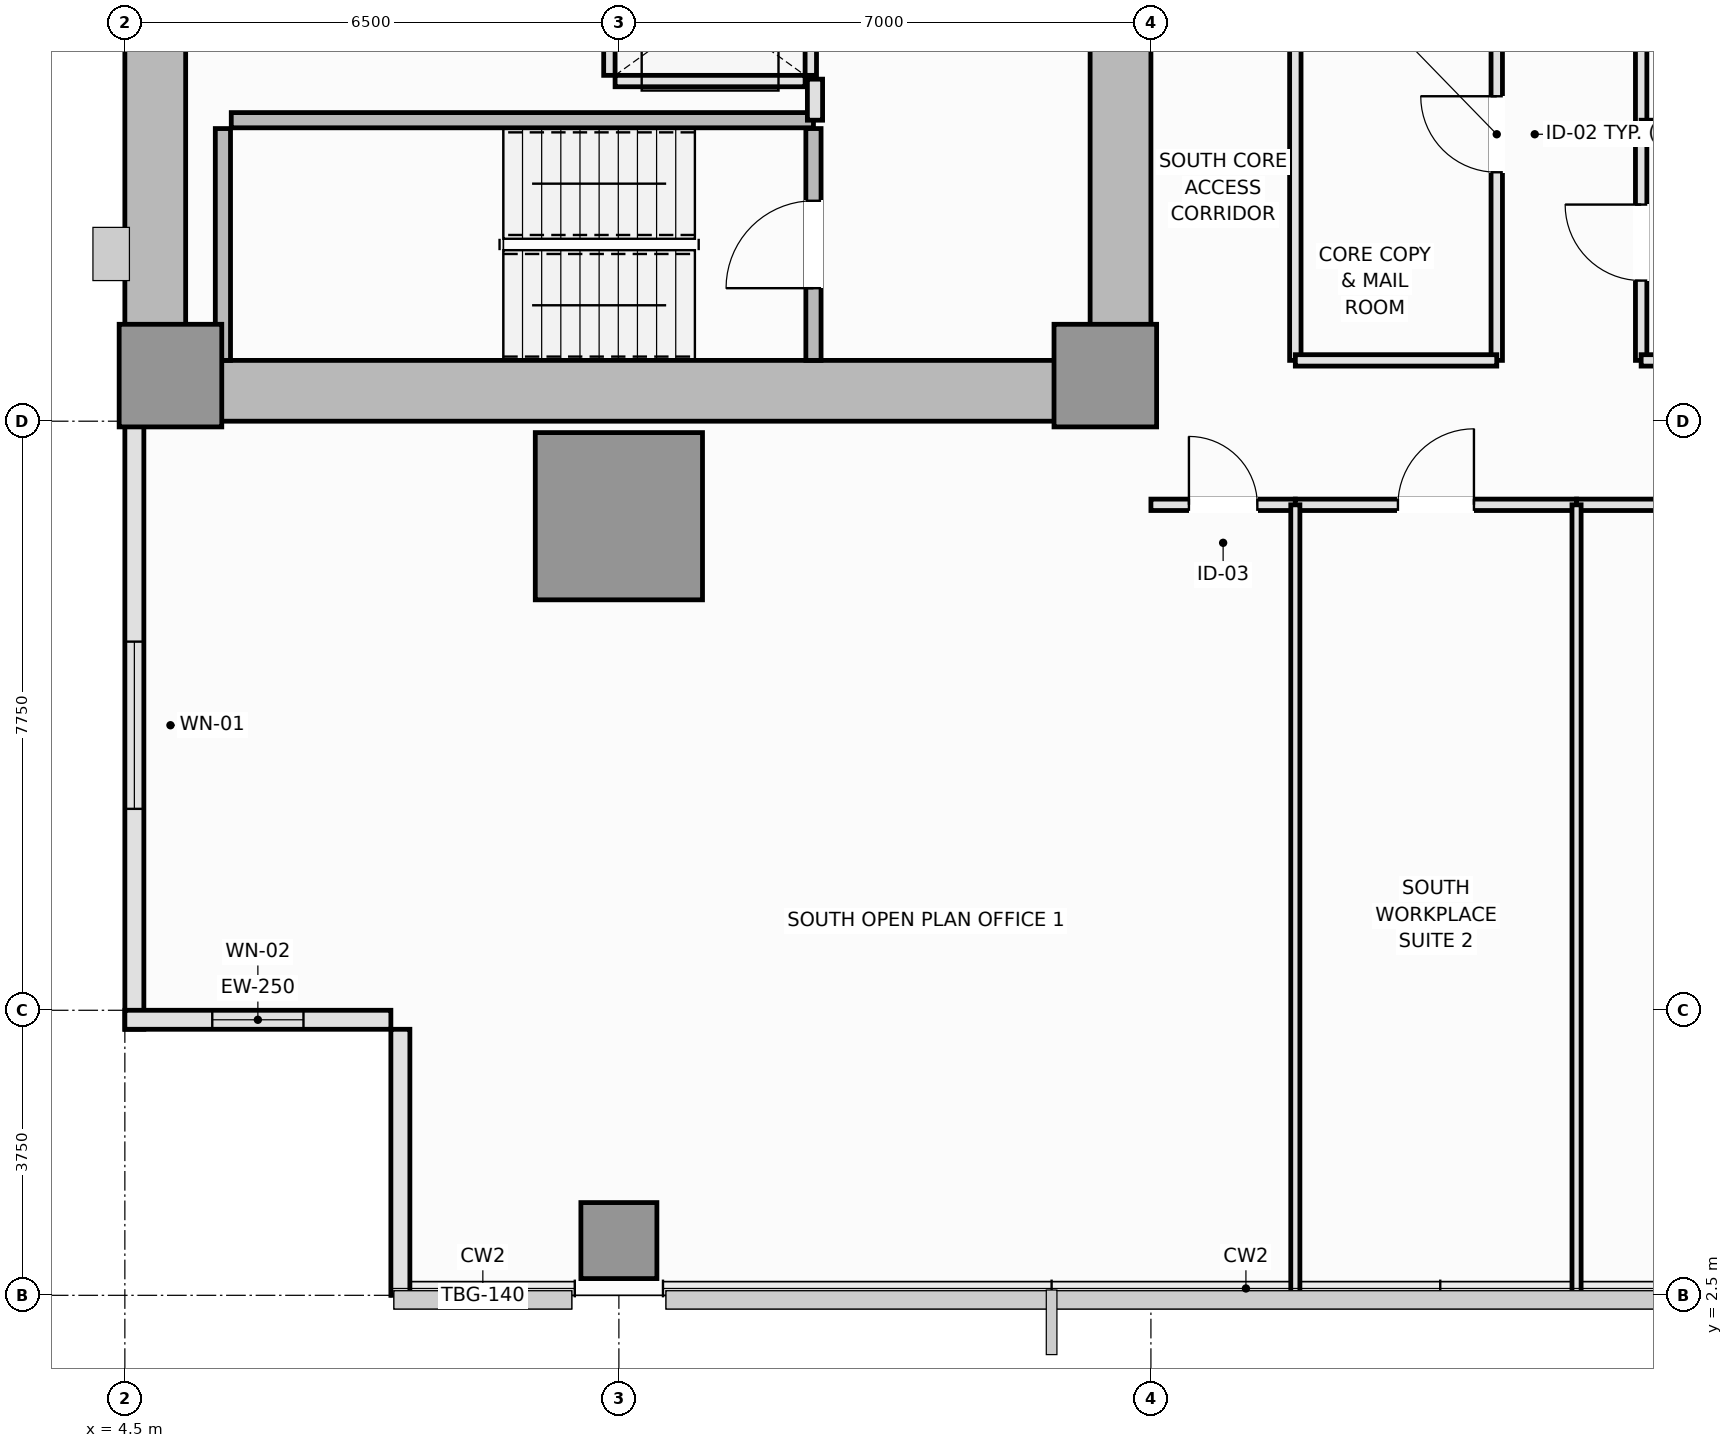
"""IFC4 building model, lengths in metres.
Left out: names, types, materials, properties, quantities, classifications, styles, units other than length and angle.
Written with IfcOpenShell. Run it as: python <this file> out.ifc"""

import sys

from ifc_helpers import new_model, si_unit, direction, frame, frame_2d, origin, origin_2d, place, context, subcontext, project, spatial, rectangle, extrude, element, fill, save


model = new_model("IFC4")
c1 = context("Model", 3, precision=1e-05, world=origin(), true_north=direction((0.0, 1.0)))
c2 = subcontext(c1, "Body", "Model", "MODEL_VIEW")
j1 = project(units=[si_unit("LENGTHUNIT", "METRE"), si_unit("PLANEANGLEUNIT", "RADIAN")], contexts=[c1])
p1 = place(None, origin())
s1 = spatial("IfcSite", under=j1, at=p1, CompositionType="ELEMENT")
p2 = place(p1, origin())
s2 = spatial("IfcBuilding", under=s1, at=p2, CompositionType="ELEMENT")
p3 = place(p2, frame((0.0, 0.0, 82.4)))
s3 = spatial("IfcBuildingStorey", under=s2, at=p3, CompositionType="ELEMENT", Elevation=82.4)
p4 = place(p3, frame((4.5, 14.4, 0.0), z_axis=(0.0, 0.0, 1.0), x_axis=(1.0, 0.0, 0.0)))
e1 = element("IfcWall", 1, at=p4, inside=s3, PredefinedType="SHEAR", context=c2, shape_type="SweptSolid", body=[
    extrude(rectangle(XDim=13.5, YDim=0.8, at=frame_2d((6.75, 0.0))), origin(), (0.0, 0.0, 1.0), 3.55),
])
p5 = place(p3, frame((4.9, 14.8, 0.0), z_axis=(0.0, 0.0, 1.0), x_axis=(0.0, 1.0, 0.0)))
e2 = element("IfcWall", 2, at=p5, inside=s3, PredefinedType="SHEAR", context=c2, shape_type="SweptSolid", body=[
    extrude(rectangle(XDim=20.9, YDim=0.8, at=frame_2d((10.45, 0.0))), origin(), (0.0, 0.0, 1.0), 3.55),
])
p6 = place(p3, frame((17.6, 14.8, 0.0), z_axis=(0.0, 0.0, 1.0), x_axis=(0.0, 1.0, 0.0)))
e3 = element("IfcWall", 3, at=p6, inside=s3, PredefinedType="SHEAR", context=c2, shape_type="SweptSolid", body=[
    extrude(rectangle(XDim=8.65, YDim=0.8, at=frame_2d((4.325, 0.0))), origin(), (0.0, 0.0, 1.0), 3.55),
])
p7 = place(p6, frame((4.1, 0.0, 0.0)))
e4 = element("IfcOpeningElement", 4, at=p7, cuts=e3, PredefinedType="OPENING", context=c2, shape_type="SweptSolid", body=[
    extrude(rectangle(XDim=1.1, YDim=2.15, at=frame_2d((0.55, 1.075))), frame((0.0, 0.41, 0.0), z_axis=(0.0, -1.0, 0.0), x_axis=(1.0, 0.0, 0.0)), (0.0, 0.0, 1.0), 0.82),
])
for number, where, z_axis, x_axis in (
    (5, (5.1, 14.6, 0.0), (0.0, 0.0, 1.0), (1.0, 0.0, 0.0)),
    (6, (17.4, 14.6, 0.0), (0.0, 0.0, 1.0), (1.0, 0.0, 0.0)),
):
    element("IfcColumn", number, at=place(p3, frame(where, z_axis=z_axis, x_axis=x_axis)), inside=s3, PredefinedType="PILASTER", context=c2, shape_type="SweptSolid", body=[
        extrude(rectangle(XDim=1.35, YDim=1.35, at=origin_2d()), origin(), (0.0, 0.0, 1.0), 3.55),
    ])
p8 = place(p3, frame((11.0, 12.75, 0.0), z_axis=(0.0, 0.0, 1.0), x_axis=(1.0, 0.0, 0.0)))
e7 = element("IfcColumn", 7, at=p8, inside=s3, PredefinedType="COLUMN", context=c2, shape_type="SweptSolid", body=[
    extrude(rectangle(XDim=2.2, YDim=2.2, at=origin_2d()), origin(), (0.0, 0.0, 1.0), 3.55),
])
p9 = place(p3, frame((11.0, 3.22, 0.0), z_axis=(0.0, 0.0, 1.0), x_axis=(1.0, 0.0, 0.0)))
e8 = element("IfcColumn", 8, at=p9, inside=s3, PredefinedType="COLUMN", context=c2, shape_type="SweptSolid", body=[
    extrude(rectangle(XDim=1.0, YDim=1.0, at=origin_2d()), origin(), (0.0, 0.0, 1.0), 3.55),
])
p10 = place(p3, frame((4.625, 14.0, 0.0), z_axis=(0.0, 0.0, 1.0), x_axis=(0.0, -1.0, 0.0)))
e9 = element("IfcWall", 9, at=p10, inside=s3, PredefinedType="SOLIDWALL", context=c2, shape_type="SweptSolid", body=[
    extrude(rectangle(XDim=8.0, YDim=0.25, at=frame_2d((4.0, 0.0))), origin(), (0.0, 0.0, 1.0), 3.37),
])
p11 = place(p10, frame((2.9, 0.0, 0.9)))
e10 = element("IfcOpeningElement", 10, at=p11, cuts=e9, PredefinedType="OPENING", context=c2, shape_type="SweptSolid", body=[
    extrude(rectangle(XDim=2.2, YDim=1.8, at=frame_2d((1.1, 0.9))), frame((0.0, 0.135, 0.0), z_axis=(0.0, -1.0, 0.0), x_axis=(1.0, 0.0, 0.0)), (0.0, 0.0, 1.0), 0.27),
])
p12 = place(p3, frame((4.5, 6.125, 0.0), z_axis=(0.0, 0.0, 1.0), x_axis=(1.0, 0.0, 0.0)))
e11 = element("IfcWall", 11, at=p12, inside=s3, PredefinedType="SOLIDWALL", context=c2, shape_type="SweptSolid", body=[
    extrude(rectangle(XDim=3.5, YDim=0.25, at=frame_2d((1.75, 0.0))), origin(), (0.0, 0.0, 1.0), 3.37),
])
p13 = place(p12, frame((1.15, 0.0, 0.9)))
e12 = element("IfcOpeningElement", 12, at=p13, cuts=e11, PredefinedType="OPENING", context=c2, shape_type="SweptSolid", body=[
    extrude(rectangle(XDim=1.2, YDim=1.8, at=frame_2d((0.6, 0.9))), frame((0.0, 0.135, 0.0), z_axis=(0.0, -1.0, 0.0), x_axis=(1.0, 0.0, 0.0)), (0.0, 0.0, 1.0), 0.27),
])
p14 = place(p3, frame((8.125, 6.0, 0.0), z_axis=(0.0, 0.0, 1.0), x_axis=(0.0, -1.0, 0.0)))
e13 = element("IfcWall", 13, at=p14, inside=s3, PredefinedType="SOLIDWALL", context=c2, shape_type="SweptSolid", body=[
    extrude(rectangle(XDim=3.5, YDim=0.25, at=frame_2d((1.75, 0.0))), origin(), (0.0, 0.0, 1.0), 3.37),
])
p15 = place(p3, frame((5.79, 14.8, 0.0), z_axis=(0.0, 0.0, 1.0), x_axis=(0.0, 1.0, 0.0)))
e14 = element("IfcWall", 14, at=p15, inside=s3, PredefinedType="SOLIDWALL", context=c2, shape_type="SweptSolid", body=[
    extrude(rectangle(XDim=3.05, YDim=0.2, at=frame_2d((1.525, 0.0))), origin(), (0.0, 0.0, 1.0), 3.55),
])
p16 = place(p3, frame((5.9, 17.96, 0.0), z_axis=(0.0, 0.0, 1.0), x_axis=(1.0, 0.0, 0.0)))
e15 = element("IfcWall", 15, at=p16, inside=s3, PredefinedType="SOLIDWALL", context=c2, shape_type="SweptSolid", body=[
    extrude(rectangle(XDim=7.66, YDim=0.2, at=frame_2d((3.83, 0.0))), origin(), (0.0, 0.0, 1.0), 3.55),
])
p17 = place(p3, frame((13.56, 14.8, 0.0), z_axis=(0.0, 0.0, 1.0), x_axis=(0.0, 1.0, 0.0)))
e16 = element("IfcWall", 16, at=p17, inside=s3, PredefinedType="SOLIDWALL", context=c2, shape_type="SweptSolid", body=[
    extrude(rectangle(XDim=3.05, YDim=0.2, at=frame_2d((1.525, 0.0))), origin(), (0.0, 0.0, 1.0), 3.55),
])
p18 = place(p17, frame((0.95, 0.0, 0.0)))
e17 = element("IfcOpeningElement", 17, at=p18, cuts=e16, PredefinedType="OPENING", context=c2, shape_type="SweptSolid", body=[
    extrude(rectangle(XDim=1.15, YDim=2.15, at=frame_2d((0.575, 1.075))), frame((0.0, 0.11, 0.0), z_axis=(0.0, -1.0, 0.0), x_axis=(1.0, 0.0, 0.0)), (0.0, 0.0, 1.0), 0.22),
])
p19 = place(p3, frame((10.95, 18.475, 0.0), z_axis=(0.0, 0.0, 1.0), x_axis=(1.0, 0.0, 0.0)))
e18 = element("IfcWall", 18, at=p19, inside=s3, PredefinedType="PARTITIONING", context=c2, shape_type="SweptSolid", body=[
    extrude(rectangle(XDim=2.5, YDim=0.15, at=frame_2d((1.25, 0.0))), origin(), (0.0, 0.0, 1.0), 3.37),
])
p20 = place(p3, frame((10.875, 18.55, 0.0), z_axis=(0.0, 0.0, 1.0), x_axis=(0.0, 1.0, 0.0)))
e19 = element("IfcWall", 19, at=p20, inside=s3, PredefinedType="PARTITIONING", context=c2, shape_type="SweptSolid", body=[
    extrude(rectangle(XDim=1.8, YDim=0.15, at=frame_2d((0.9, 0.0))), origin(), (0.0, 0.0, 1.0), 3.37),
])
p21 = place(p3, frame((13.525, 18.55, 0.0), z_axis=(0.0, 0.0, 1.0), x_axis=(0.0, 1.0, 0.0)))
e20 = element("IfcWall", 20, at=p21, inside=s3, PredefinedType="PARTITIONING", context=c2, shape_type="SweptSolid", body=[
    extrude(rectangle(XDim=1.8, YDim=0.15, at=frame_2d((0.9, 0.0))), origin(), (0.0, 0.0, 1.0), 3.37),
])
p22 = place(p21, frame((0.35, 0.0, 0.0)))
e21 = element("IfcOpeningElement", 21, at=p22, cuts=e20, PredefinedType="OPENING", context=c2, shape_type="SweptSolid", body=[
    extrude(rectangle(XDim=1.1, YDim=2.2, at=frame_2d((0.55, 1.1))), frame((0.0, 0.085, 0.0), z_axis=(0.0, -1.0, 0.0), x_axis=(1.0, 0.0, 0.0)), (0.0, 0.0, 1.0), 0.17),
])
p23 = place(p3, frame((13.58, 17.96, 0.0), z_axis=(0.0, 0.0, 1.0), x_axis=(0.0, 1.0, 0.0)))
e22 = element("IfcWall", 22, at=p23, inside=s3, PredefinedType="PARTITIONING", context=c2, shape_type="SweptSolid", body=[
    extrude(rectangle(XDim=0.54, YDim=0.2, at=frame_2d((0.27, 0.0))), origin(), (0.0, 0.0, 1.0), 3.37),
])
p24 = place(p3, frame((22.55, 14.8, 0.0), z_axis=(0.0, 0.0, 1.0), x_axis=(0.0, 1.0, 0.0)))
e23 = element("IfcWall", 23, at=p24, inside=s3, PredefinedType="PARTITIONING", context=c2, shape_type="SweptSolid", body=[
    extrude(rectangle(XDim=5.95, YDim=0.15, at=frame_2d((2.975, 0.0))), origin(), (0.0, 0.0, 1.0), 3.01),
])
p25 = place(p24, frame((2.475, 0.0, 0.0)))
e24 = element("IfcOpeningElement", 24, at=p25, cuts=e23, PredefinedType="OPENING", context=c2, shape_type="SweptSolid", body=[
    extrude(rectangle(XDim=1.0, YDim=2.15, at=frame_2d((0.5, 1.075))), frame((0.0, 0.085, 0.0), z_axis=(0.0, -1.0, 0.0), x_axis=(1.0, 0.0, 0.0)), (0.0, 0.0, 1.0), 0.17),
])
p26 = place(p3, frame((24.45, 14.8, 0.0), z_axis=(0.0, 0.0, 1.0), x_axis=(0.0, 1.0, 0.0)))
e25 = element("IfcWall", 25, at=p26, inside=s3, PredefinedType="PARTITIONING", context=c2, shape_type="SweptSolid", body=[
    extrude(rectangle(XDim=3.1, YDim=0.15, at=frame_2d((1.55, 0.0))), origin(), (0.0, 0.0, 1.0), 3.37),
])
p27 = place(p26, frame((1.05, 0.0, 0.0)))
e26 = element("IfcOpeningElement", 26, at=p27, cuts=e25, PredefinedType="OPENING", context=c2, shape_type="SweptSolid", body=[
    extrude(rectangle(XDim=1.0, YDim=2.15, at=frame_2d((0.5, 1.075))), frame((0.0, 0.085, 0.0), z_axis=(0.0, -1.0, 0.0), x_axis=(1.0, 0.0, 0.0)), (0.0, 0.0, 1.0), 0.17),
])
p28 = place(p3, frame((24.45, 17.9, 0.0), z_axis=(0.0, 0.0, 1.0), x_axis=(0.0, 1.0, 0.0)))
e27 = element("IfcWall", 27, at=p28, inside=s3, PredefinedType="PARTITIONING", context=c2, shape_type="SweptSolid", body=[
    extrude(rectangle(XDim=7.35, YDim=0.15, at=frame_2d((3.675, 0.0))), origin(), (0.0, 0.0, 1.0), 3.37),
])
p29 = place(p28, frame((3.175, 0.0, 0.0)))
e28 = element("IfcOpeningElement", 28, at=p29, cuts=e27, PredefinedType="OPENING", context=c2, shape_type="SweptSolid", body=[
    extrude(rectangle(XDim=1.0, YDim=2.15, at=frame_2d((0.5, 1.075))), frame((0.0, 0.085, 0.0), z_axis=(0.0, -1.0, 0.0), x_axis=(1.0, 0.0, 0.0)), (0.0, 0.0, 1.0), 0.17),
])
p30 = place(p3, frame((19.9, 14.8, 0.0), z_axis=(0.0, 0.0, 1.0), x_axis=(0.0, 1.0, 0.0)))
e29 = element("IfcWall", 29, at=p30, inside=s3, PredefinedType="PARTITIONING", context=c2, shape_type="SweptSolid", body=[
    extrude(rectangle(XDim=5.95, YDim=0.15, at=frame_2d((2.975, 0.0))), origin(), (0.0, 0.0, 1.0), 3.37),
])
p31 = place(p3, frame((19.9, 14.8, 0.0), z_axis=(0.0, 0.0, 1.0), x_axis=(1.0, 0.0, 0.0)))
e30 = element("IfcWall", 30, at=p31, inside=s3, PredefinedType="PARTITIONING", context=c2, shape_type="SweptSolid", body=[
    extrude(rectangle(XDim=2.65, YDim=0.15, at=frame_2d((1.325, 0.0))), origin(), (0.0, 0.0, 1.0), 3.37),
])
p32 = place(p3, frame((24.45, 14.8, 0.0), z_axis=(0.0, 0.0, 1.0), x_axis=(1.0, 0.0, 0.0)))
e31 = element("IfcWall", 31, at=p32, inside=s3, PredefinedType="PARTITIONING", context=c2, shape_type="SweptSolid", body=[
    extrude(rectangle(XDim=6.35, YDim=0.15, at=frame_2d((3.175, 0.0))), origin(), (0.0, 0.0, 1.0), 3.37),
])
p33 = place(p3, frame((18.0, 12.9, 0.0), z_axis=(0.0, 0.0, 1.0), x_axis=(1.0, 0.0, 0.0)))
e32 = element("IfcWall", 32, at=p33, inside=s3, PredefinedType="PARTITIONING", context=c2, shape_type="SweptSolid", body=[
    extrude(rectangle(XDim=1.9, YDim=0.15, at=frame_2d((0.95, 0.0))), origin(), (0.0, 0.0, 1.0), 2.72),
])
p34 = place(p33, frame((0.5, 0.0, 0.0)))
e33 = element("IfcOpeningElement", 33, at=p34, cuts=e32, PredefinedType="OPENING", context=c2, shape_type="SweptSolid", body=[
    extrude(rectangle(XDim=0.9, YDim=2.1, at=frame_2d((0.45, 1.05))), frame((0.0, 0.085, 0.0), z_axis=(0.0, -1.0, 0.0), x_axis=(1.0, 0.0, 0.0)), (0.0, 0.0, 1.0), 0.17),
])
p35 = place(p3, frame((19.9, 12.9, 0.0), z_axis=(0.0, 0.0, 1.0), x_axis=(1.0, 0.0, 0.0)))
e34 = element("IfcWall", 34, at=p35, inside=s3, PredefinedType="PARTITIONING", context=c2, shape_type="SweptSolid", body=[
    extrude(rectangle(XDim=3.7, YDim=0.15, at=frame_2d((1.85, 0.0))), origin(), (0.0, 0.0, 1.0), 2.72),
])
p36 = place(p35, frame((1.35, 0.0, 0.0)))
e35 = element("IfcOpeningElement", 35, at=p36, cuts=e34, PredefinedType="OPENING", context=c2, shape_type="SweptSolid", body=[
    extrude(rectangle(XDim=1.0, YDim=2.15, at=frame_2d((0.5, 1.075))), frame((0.0, 0.085, 0.0), z_axis=(0.0, -1.0, 0.0), x_axis=(1.0, 0.0, 0.0)), (0.0, 0.0, 1.0), 0.17),
])
p37 = place(p3, frame((23.6, 12.9, 0.0), z_axis=(0.0, 0.0, 1.0), x_axis=(1.0, 0.0, 0.0)))
e36 = element("IfcWall", 36, at=p37, inside=s3, PredefinedType="PARTITIONING", context=c2, shape_type="SweptSolid", body=[
    extrude(rectangle(XDim=3.9, YDim=0.15, at=frame_2d((1.95, 0.0))), origin(), (0.0, 0.0, 1.0), 2.72),
])
p38 = place(p37, frame((1.45, 0.0, 0.0)))
e37 = element("IfcOpeningElement", 37, at=p38, cuts=e36, PredefinedType="OPENING", context=c2, shape_type="SweptSolid", body=[
    extrude(rectangle(XDim=1.0, YDim=2.15, at=frame_2d((0.5, 1.075))), frame((0.0, 0.085, 0.0), z_axis=(0.0, -1.0, 0.0), x_axis=(1.0, 0.0, 0.0)), (0.0, 0.0, 1.0), 0.17),
])
p39 = place(p3, frame((24.45, 17.9, 0.0), z_axis=(0.0, 0.0, 1.0), x_axis=(1.0, 0.0, 0.0)))
e38 = element("IfcWall", 38, at=p39, inside=s3, PredefinedType="PARTITIONING", context=c2, shape_type="SweptSolid", body=[
    extrude(rectangle(XDim=3.05, YDim=0.12, at=frame_2d((1.525, 0.0))), origin(), (0.0, 0.0, 1.0), 3.37),
])
for number, where, z_axis, x_axis in (
    (39, (19.9, 2.51, 0.0), (0.0, 0.0, 1.0), (0.0, 1.0, 0.0)),
    (40, (23.6, 2.51, 0.0), (0.0, 0.0, 1.0), (0.0, 1.0, 0.0)),
):
    element("IfcWall", number, at=place(p3, frame(where, z_axis=z_axis, x_axis=x_axis)), inside=s3, PredefinedType="PARTITIONING", context=c2, shape_type="SweptSolid", body=[
        extrude(rectangle(XDim=10.39, YDim=0.12, at=frame_2d((5.195, 0.0))), origin(), (0.0, 0.0, 1.0), 3.37),
    ])
p40 = place(p11, origin())
e41 = element("IfcWindow", 41, at=p40, inside=s3, PartitioningType="SINGLE_PANEL", PredefinedType="WINDOW", context=c2, shape_type="SweptSolid", body=[
    extrude(rectangle(XDim=2.2, YDim=1.8, at=frame_2d((1.1, 0.9))), frame((0.0, 0.03, 0.0), z_axis=(0.0, -1.0, 0.0), x_axis=(1.0, 0.0, 0.0)), (0.0, 0.0, 1.0), 0.06),
])
fill(e10, e41)
p41 = place(p13, origin())
e42 = element("IfcWindow", 42, at=p41, inside=s3, PartitioningType="SINGLE_PANEL", PredefinedType="WINDOW", context=c2, shape_type="SweptSolid", body=[
    extrude(rectangle(XDim=1.2, YDim=1.8, at=frame_2d((0.6, 0.9))), frame((0.0, 0.03, 0.0), z_axis=(0.0, -1.0, 0.0), x_axis=(1.0, 0.0, 0.0)), (0.0, 0.0, 1.0), 0.06),
])
fill(e12, e42)
p42 = place(p18, origin())
e43 = element("IfcDoor", 43, at=p42, inside=s3, OperationType="SINGLE_SWING_LEFT", PredefinedType="DOOR", context=c2, shape_type="SweptSolid", body=[
    extrude(rectangle(XDim=1.15, YDim=2.15, at=frame_2d((0.575, 1.075))), frame((0.0, 0.025, 0.0), z_axis=(0.0, -1.0, 0.0), x_axis=(1.0, 0.0, 0.0)), (0.0, 0.0, 1.0), 0.05),
])
fill(e17, e43)
p43 = place(p25, origin())
e44 = element("IfcDoor", 44, at=p43, inside=s3, OperationType="SINGLE_SWING_RIGHT", PredefinedType="DOOR", context=c2, shape_type="SweptSolid", body=[
    extrude(rectangle(XDim=1.0, YDim=2.15, at=frame_2d((0.5, 1.075))), frame((0.0, 0.025, 0.0), z_axis=(0.0, -1.0, 0.0), x_axis=(1.0, 0.0, 0.0)), (0.0, 0.0, 1.0), 0.05),
])
fill(e24, e44)
p44 = place(p27, origin())
e45 = element("IfcDoor", 45, at=p44, inside=s3, OperationType="SINGLE_SWING_RIGHT", PredefinedType="DOOR", context=c2, shape_type="SweptSolid", body=[
    extrude(rectangle(XDim=1.0, YDim=2.15, at=frame_2d((0.5, 1.075))), frame((0.0, 0.025, 0.0), z_axis=(0.0, -1.0, 0.0), x_axis=(1.0, 0.0, 0.0)), (0.0, 0.0, 1.0), 0.05),
])
fill(e26, e45)
p45 = place(p34, origin())
e46 = element("IfcDoor", 46, at=p45, inside=s3, OperationType="SINGLE_SWING_LEFT", PredefinedType="DOOR", context=c2, shape_type="SweptSolid", body=[
    extrude(rectangle(XDim=0.9, YDim=2.1, at=frame_2d((0.45, 1.05))), frame((0.0, 0.025, 0.0), z_axis=(0.0, -1.0, 0.0), x_axis=(1.0, 0.0, 0.0)), (0.0, 0.0, 1.0), 0.05),
])
fill(e33, e46)
p46 = place(p36, origin())
e47 = element("IfcDoor", 47, at=p46, inside=s3, OperationType="SINGLE_SWING_RIGHT", PredefinedType="DOOR", context=c2, shape_type="SweptSolid", body=[
    extrude(rectangle(XDim=1.0, YDim=2.15, at=frame_2d((0.5, 1.075))), frame((0.0, 0.025, 0.0), z_axis=(0.0, -1.0, 0.0), x_axis=(1.0, 0.0, 0.0)), (0.0, 0.0, 1.0), 0.05),
])
fill(e35, e47)
save(model, sys.argv[1])
